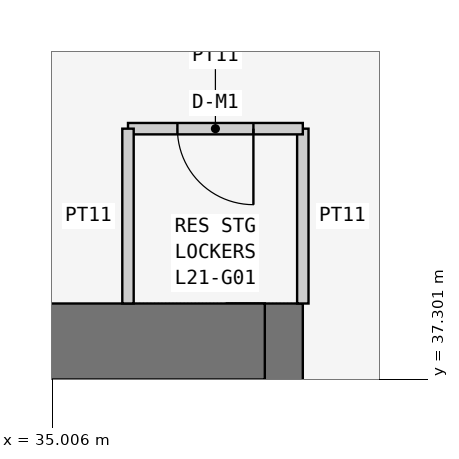
"""IFC4 building model, lengths in metres.
Left out: names, types, materials, properties, quantities, classifications, styles, units other than length and angle.
Written with IfcOpenShell. Run it as: python <this file> out.ifc"""

import sys

from ifc_helpers import new_model, si_unit, direction, frame, frame_2d, origin, place, context, subcontext, project, spatial, rectangle, extrude, element, fill, save


model = new_model("IFC4")
c1 = context("Model", 3, precision=1e-05, world=origin(), true_north=direction((0.0, 1.0)))
c2 = subcontext(c1, "Body", "Model", "MODEL_VIEW")
j1 = project(units=[si_unit("LENGTHUNIT", "METRE"), si_unit("PLANEANGLEUNIT", "RADIAN")], contexts=[c1])
p1 = place(None, origin())
s1 = spatial("IfcSite", under=j1, at=p1, CompositionType="ELEMENT")
p2 = place(p1, origin())
s2 = spatial("IfcBuilding", under=s1, at=p2, CompositionType="ELEMENT")
p3 = place(p2, frame((0.0, 0.0, 84.9)))
s3 = spatial("IfcBuildingStorey", under=s2, at=p3, CompositionType="ELEMENT", Elevation=84.9)
p4 = place(p3, frame((37.8, 21.0, 0.0), z_axis=(0.0, 0.0, 1.0), x_axis=(0.0, 1.0, 0.0)))
e1 = element("IfcWall", 1, at=p4, inside=s3, PredefinedType="SHEAR", context=c2, shape_type="SweptSolid", body=[
    extrude(rectangle(XDim=17.3, YDim=1.0, at=frame_2d((8.65, 0.0))), origin(), (0.0, 0.0, 1.0), 3.6),
])
p5 = place(p4, frame((5.2, 0.0, 0.0)))
e2 = element("IfcOpeningElement", 2, at=p5, cuts=e1, PredefinedType="OPENING", context=c2, shape_type="SweptSolid", body=[
    extrude(rectangle(XDim=1.2, YDim=2.1, at=frame_2d((0.6, 1.05))), frame((0.0, 0.51, 0.0), z_axis=(0.0, -1.0, 0.0), x_axis=(1.0, 0.0, 0.0)), (0.0, 0.0, 1.0), 1.02),
])
p6 = place(p3, frame((37.8, 37.8, 0.0), z_axis=(0.0, 0.0, 1.0), x_axis=(-1.0, 0.0, 0.0)))
e3 = element("IfcWall", 3, at=p6, inside=s3, PredefinedType="SHEAR", context=c2, shape_type="SweptSolid", body=[
    extrude(rectangle(XDim=17.3, YDim=1.0, at=frame_2d((8.65, 0.0))), origin(), (0.0, 0.0, 1.0), 3.6),
])
p7 = place(p3, frame((38.3, 38.3, 0.0), z_axis=(0.0, 0.0, 1.0), x_axis=(0.0, 1.0, 0.0)))
e4 = element("IfcWall", 4, at=p7, inside=s3, PredefinedType="PARTITIONING", context=c2, shape_type="SweptSolid", body=[
    extrude(rectangle(XDim=2.3, YDim=0.15, at=frame_2d((1.15, 0.0))), origin(), (0.0, 0.0, 1.0), 3.45),
])
p8 = place(p3, frame((38.3, 40.6, 0.0), z_axis=(0.0, 0.0, 1.0), x_axis=(-1.0, 0.0, 0.0)))
e5 = element("IfcWall", 5, at=p8, inside=s3, PredefinedType="PARTITIONING", context=c2, shape_type="SweptSolid", body=[
    extrude(rectangle(XDim=2.3, YDim=0.15, at=frame_2d((1.15, 0.0))), origin(), (0.0, 0.0, 1.0), 3.45),
])
p9 = place(p8, frame((0.65, 0.0, 0.0)))
e6 = element("IfcOpeningElement", 6, at=p9, cuts=e5, PredefinedType="OPENING", context=c2, shape_type="SweptSolid", body=[
    extrude(rectangle(XDim=1.0, YDim=2.1, at=frame_2d((0.5, 1.05))), frame((0.0, 0.085, 0.0), z_axis=(0.0, -1.0, 0.0), x_axis=(1.0, 0.0, 0.0)), (0.0, 0.0, 1.0), 0.17),
])
p10 = place(p3, frame((36.0, 40.6, 0.0), z_axis=(0.0, 0.0, 1.0), x_axis=(0.0, -1.0, 0.0)))
e7 = element("IfcWall", 7, at=p10, inside=s3, PredefinedType="PARTITIONING", context=c2, shape_type="SweptSolid", body=[
    extrude(rectangle(XDim=2.3, YDim=0.15, at=frame_2d((1.15, 0.0))), origin(), (0.0, 0.0, 1.0), 3.45),
])
p11 = place(p9, origin())
e8 = element("IfcDoor", 8, at=p11, inside=s3, OperationType="SINGLE_SWING_LEFT", PredefinedType="DOOR", context=c2, shape_type="SweptSolid", body=[
    extrude(rectangle(XDim=1.0, YDim=2.1, at=frame_2d((0.5, 1.05))), frame((0.0, 0.025, 0.0), z_axis=(0.0, -1.0, 0.0), x_axis=(1.0, 0.0, 0.0)), (0.0, 0.0, 1.0), 0.05),
])
fill(e6, e8)
save(model, sys.argv[1])
